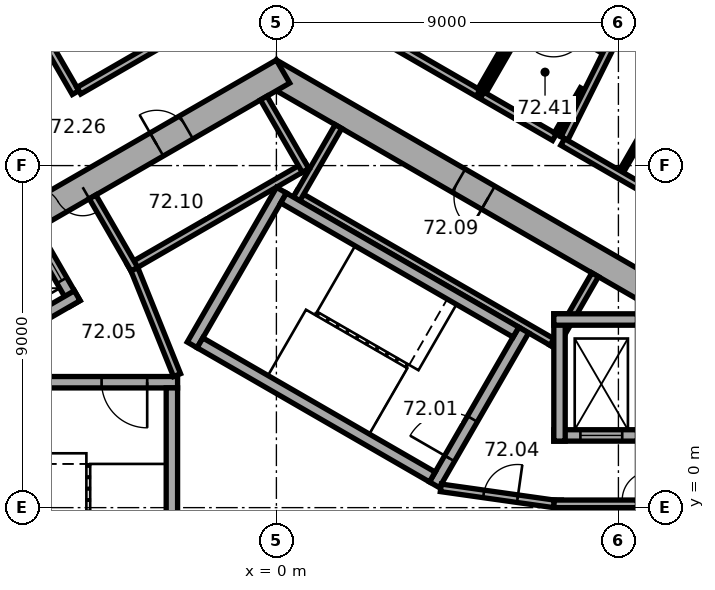
"""IFC4 building model, lengths in metres.
Left out: names, types, materials, properties, quantities, classifications, styles, units other than length and angle.
Written with IfcOpenShell. Run it as: python <this file> out.ifc"""

import sys

from ifc_helpers import new_model, si_unit, direction, frame, frame_2d, origin, place, context, subcontext, project, spatial, rectangle, extrude, element, fill, save


model = new_model("IFC4")
c1 = context("Model", 3, precision=1e-05, world=origin(), true_north=direction((0.0, 1.0)))
c2 = subcontext(c1, "Body", "Model", "MODEL_VIEW")
j1 = project(units=[si_unit("LENGTHUNIT", "METRE"), si_unit("PLANEANGLEUNIT", "RADIAN")], contexts=[c1])
p1 = place(None, origin())
s1 = spatial("IfcSite", under=j1, at=p1, CompositionType="ELEMENT")
p2 = place(p1, origin())
s2 = spatial("IfcBuilding", under=s1, at=p2, CompositionType="ELEMENT")
p3 = place(p2, frame((0.0, 0.0, 293.1)))
s3 = spatial("IfcBuildingStorey", under=s2, at=p3, CompositionType="ELEMENT", Elevation=293.1)
p4 = place(p3, frame((10.025, 5.586, 0.0), z_axis=(0.0, 0.0, 1.0), x_axis=(-0.866026453023, 0.499998182661, 0.0)))
e1 = element("IfcWall", 1, at=p4, inside=s3, PredefinedType="SHEAR", context=c2, shape_type="SweptSolid", body=[
    extrude(rectangle(XDim=11.778, YDim=0.7, at=frame_2d((5.889, 0.0))), origin(), (0.0, 0.0, 1.0), 3.7),
])
p5 = place(p4, frame((5.139, 0.0, 0.0)))
e2 = element("IfcOpeningElement", 2, at=p5, cuts=e1, PredefinedType="OPENING", context=c2, shape_type="SweptSolid", body=[
    extrude(rectangle(XDim=0.9, YDim=2.1, at=frame_2d((0.45, 1.05))), frame((0.0, 0.36, 0.0), z_axis=(0.0, -1.0, 0.0), x_axis=(1.0, 0.0, 0.0)), (0.0, 0.0, 1.0), 0.72),
])
p6 = place(p3, frame((0.175, 11.475, 0.0), z_axis=(0.0, 0.0, 1.0), x_axis=(-0.866026453023, -0.499998182661, 0.0)))
e3 = element("IfcWall", 3, at=p6, inside=s3, PredefinedType="SHEAR", context=c2, shape_type="SweptSolid", body=[
    extrude(rectangle(XDim=11.778, YDim=0.7, at=frame_2d((5.889, 0.0))), origin(), (0.0, 0.0, 1.0), 3.7),
])
p7 = place(p6, frame((6.089, 0.0, 0.0)))
e4 = element("IfcOpeningElement", 4, at=p7, cuts=e3, PredefinedType="OPENING", context=c2, shape_type="SweptSolid", body=[
    extrude(rectangle(XDim=1.5, YDim=2.1, at=frame_2d((0.75, 1.05))), frame((0.0, 0.36, 0.0), z_axis=(0.0, -1.0, 0.0), x_axis=(1.0, 0.0, 0.0)), (0.0, 0.0, 1.0), 0.72),
])
p8 = place(p6, frame((2.939, 0.0, 0.0)))
e5 = element("IfcOpeningElement", 5, at=p8, cuts=e3, PredefinedType="OPENING", context=c2, shape_type="SweptSolid", body=[
    extrude(rectangle(XDim=0.9, YDim=2.1, at=frame_2d((0.45, 1.05))), frame((0.0, 0.36, 0.0), z_axis=(0.0, -1.0, 0.0), x_axis=(1.0, 0.0, 0.0)), (0.0, 0.0, 1.0), 0.72),
])
p9 = place(p3, frame((-2.624, 20.713, 0.0), z_axis=(0.0, 0.0, 1.0), x_axis=(-0.866026460444, -0.499998169808, 0.0)))
e6 = element("IfcWall", 6, at=p9, inside=s3, PredefinedType="STANDARD", context=c2, shape_type="SweptSolid", body=[
    extrude(rectangle(XDim=17.731, YDim=0.2, at=frame_2d((8.866, 0.0))), origin(), (0.0, 0.0, 1.0), 3.7),
])
p10 = place(p9, frame((1.203, 0.0, 0.9)))
e7 = element("IfcOpeningElement", 7, at=p10, cuts=e6, PredefinedType="OPENING", context=c2, shape_type="SweptSolid", body=[
    extrude(rectangle(XDim=2.0, YDim=2.0, at=frame_2d((1.0, 1.0))), frame((0.0, 0.11, 0.0), z_axis=(0.0, -1.0, 0.0), x_axis=(1.0, 0.0, 0.0)), (0.0, 0.0, 1.0), 0.22),
])
p11 = place(p9, frame((4.535, 0.0, 0.9)))
e8 = element("IfcOpeningElement", 8, at=p11, cuts=e6, PredefinedType="OPENING", context=c2, shape_type="SweptSolid", body=[
    extrude(rectangle(XDim=2.0, YDim=2.0, at=frame_2d((1.0, 1.0))), frame((0.0, 0.11, 0.0), z_axis=(0.0, -1.0, 0.0), x_axis=(1.0, 0.0, 0.0)), (0.0, 0.0, 1.0), 0.22),
])
p12 = place(p9, frame((7.867, 0.0, 0.9)))
e9 = element("IfcOpeningElement", 9, at=p12, cuts=e6, PredefinedType="OPENING", context=c2, shape_type="SweptSolid", body=[
    extrude(rectangle(XDim=2.0, YDim=2.0, at=frame_2d((1.0, 1.0))), frame((0.0, 0.11, 0.0), z_axis=(0.0, -1.0, 0.0), x_axis=(1.0, 0.0, 0.0)), (0.0, 0.0, 1.0), 0.22),
])
p13 = place(p9, frame((11.198, 0.0, 0.9)))
e10 = element("IfcOpeningElement", 10, at=p13, cuts=e6, PredefinedType="OPENING", context=c2, shape_type="SweptSolid", body=[
    extrude(rectangle(XDim=2.0, YDim=2.0, at=frame_2d((1.0, 1.0))), frame((0.0, 0.11, 0.0), z_axis=(0.0, -1.0, 0.0), x_axis=(1.0, 0.0, 0.0)), (0.0, 0.0, 1.0), 0.22),
])
p14 = place(p9, frame((14.53, 0.0, 0.9)))
e11 = element("IfcOpeningElement", 11, at=p14, cuts=e6, PredefinedType="OPENING", context=c2, shape_type="SweptSolid", body=[
    extrude(rectangle(XDim=2.0, YDim=2.0, at=frame_2d((1.0, 1.0))), frame((0.0, 0.11, 0.0), z_axis=(0.0, -1.0, 0.0), x_axis=(1.0, 0.0, 0.0)), (0.0, 0.0, 1.0), 0.22),
])
p15 = place(p3, frame((7.4, -5.2, 0.0), z_axis=(0.0, 0.0, 1.0), x_axis=(0.0, 1.0, 0.0)))
e12 = element("IfcWall", 12, at=p15, inside=s3, PredefinedType="PARTITIONING", context=c2, shape_type="SweptSolid", body=[
    extrude(rectangle(XDim=5.4, YDim=0.2, at=frame_2d((2.7, 0.0))), origin(), (0.0, 0.0, 1.0), 3.42),
])
p16 = place(p3, frame((7.3, 0.1, 0.0), z_axis=(0.0, 0.0, 1.0), x_axis=(1.0, 0.0, 0.0)))
e13 = element("IfcWall", 13, at=p16, inside=s3, PredefinedType="PARTITIONING", context=c2, shape_type="SweptSolid", body=[
    extrude(rectangle(XDim=2.2, YDim=0.2, at=frame_2d((1.1, 0.0))), origin(), (0.0, 0.0, 1.0), 3.42),
])
p17 = place(p3, frame((7.424, 4.259, 0.0), z_axis=(0.0, 0.0, 1.0), x_axis=(-0.866026010844, 0.49999894854, 0.0)))
e14 = element("IfcWall", 14, at=p17, inside=s3, PredefinedType="PARTITIONING", context=c2, shape_type="SweptSolid", body=[
    extrude(rectangle(XDim=8.0, YDim=0.2, at=frame_2d((4.0, 0.0))), origin(), (0.0, 0.0, 1.0), 3.42),
])
for number, where, z_axis, x_axis in (
    (15, (7.287, 4.222, 0.0), (0.0, 0.0, 1.0), (0.5, 0.866, 0.0)),
    (16, (0.532, 8.122, 0.0), (0.0, 0.0, 1.0), (0.5, 0.866, 0.0)),
):
    element("IfcWall", number, at=place(p3, frame(where, z_axis=z_axis, x_axis=x_axis)), inside=s3, PredefinedType="PARTITIONING", context=c2, shape_type="SweptSolid", body=[
        extrude(rectangle(XDim=2.2, YDim=0.2, at=frame_2d((1.1, 0.0))), origin(), (0.0, 0.0, 1.0), 3.42),
    ])
p18 = place(p3, frame((0.803, 9.009, 0.0), z_axis=(0.0, 0.0, 1.0), x_axis=(-0.866028230842, -0.499995103361, 0.0)))
e17 = element("IfcWall", 17, at=p18, inside=s3, PredefinedType="PARTITIONING", context=c2, shape_type="SweptSolid", body=[
    extrude(rectangle(XDim=5.4, YDim=0.2, at=frame_2d((2.7, 0.0))), origin(), (0.0, 0.0, 1.0), 3.42),
])
p19 = place(p3, frame((0.767, 8.872, 0.0), z_axis=(0.0, 0.0, 1.0), x_axis=(-0.499994660107, 0.866028486751, 0.0)))
e18 = element("IfcWall", 18, at=p19, inside=s3, PredefinedType="PARTITIONING", context=c2, shape_type="SweptSolid", body=[
    extrude(rectangle(XDim=2.2, YDim=0.2, at=frame_2d((1.1, 0.0))), origin(), (0.0, 0.0, 1.0), 3.42),
])
p20 = place(p3, frame((-3.737, 6.272, 0.0), z_axis=(0.0, 0.0, 1.0), x_axis=(-0.50002983664, 0.866008176907, 0.0)))
e19 = element("IfcWall", 19, at=p20, inside=s3, PredefinedType="PARTITIONING", context=c2, shape_type="SweptSolid", body=[
    extrude(rectangle(XDim=2.2, YDim=0.2, at=frame_2d((1.1, 0.0))), origin(), (0.0, 0.0, 1.0), 3.42),
])
p21 = place(p3, frame((4.158, 0.602, 0.0), z_axis=(0.0, 0.0, 1.0), x_axis=(0.499977259774, 0.866038532462, 0.0)))
e20 = element("IfcWall", 20, at=p21, inside=s3, PredefinedType="SHEAR", context=c2, shape_type="SweptSolid", body=[
    extrude(rectangle(XDim=4.7, YDim=0.3, at=frame_2d((2.35, 0.0))), origin(), (0.0, 0.0, 1.0), 3.42),
])
p22 = place(p21, frame((0.8, 0.0, 0.0)))
e21 = element("IfcOpeningElement", 21, at=p22, cuts=e20, PredefinedType="OPENING", context=c2, shape_type="SweptSolid", body=[
    extrude(rectangle(XDim=1.2, YDim=2.1, at=frame_2d((0.6, 1.05))), frame((0.0, 0.16, 0.0), z_axis=(0.0, -1.0, 0.0), x_axis=(1.0, 0.0, 0.0)), (0.0, 0.0, 1.0), 0.32),
])
p23 = place(p3, frame((-2.216, 4.282, 0.0), z_axis=(0.0, 0.0, 1.0), x_axis=(0.499977259774, 0.866038532462, 0.0)))
e22 = element("IfcWall", 22, at=p23, inside=s3, PredefinedType="SHEAR", context=c2, shape_type="SweptSolid", body=[
    extrude(rectangle(XDim=4.7, YDim=0.3, at=frame_2d((2.35, 0.0))), origin(), (0.0, 0.0, 1.0), 3.42),
])
for number, where, z_axis, x_axis in (
    (23, (4.103, 0.807, 0.0), (0.0, 0.0, 1.0), (-0.866, 0.5, 0.0)),
    (24, (6.303, 4.617, 0.0), (0.0, 0.0, 1.0), (-0.866, 0.5, 0.0)),
):
    element("IfcWall", number, at=place(p3, frame(where, z_axis=z_axis, x_axis=x_axis)), inside=s3, PredefinedType="SHEAR", context=c2, shape_type="SweptSolid", body=[
        extrude(rectangle(XDim=7.06, YDim=0.3, at=frame_2d((3.53, 0.0))), origin(), (0.0, 0.0, 1.0), 3.42),
    ])
p24 = place(p3, frame((-2.6, 3.3, 0.0), z_axis=(0.0, 0.0, 1.0), x_axis=(-1.0, 0.0, 0.0)))
e25 = element("IfcWall", 25, at=p24, inside=s3, PredefinedType="SHEAR", context=c2, shape_type="SweptSolid", body=[
    extrude(rectangle(XDim=4.7, YDim=0.3, at=frame_2d((2.35, 0.0))), origin(), (0.0, 0.0, 1.0), 3.42),
])
p25 = place(p24, frame((0.8, 0.0, 0.0)))
e26 = element("IfcOpeningElement", 26, at=p25, cuts=e25, PredefinedType="OPENING", context=c2, shape_type="SweptSolid", body=[
    extrude(rectangle(XDim=1.2, YDim=2.1, at=frame_2d((0.6, 1.05))), frame((0.0, 0.16, 0.0), z_axis=(0.0, -1.0, 0.0), x_axis=(1.0, 0.0, 0.0)), (0.0, 0.0, 1.0), 0.32),
])
p26 = place(p3, frame((-2.75, 3.15, 0.0), z_axis=(0.0, 0.0, 1.0), x_axis=(0.0, -1.0, 0.0)))
e27 = element("IfcWall", 27, at=p26, inside=s3, PredefinedType="SHEAR", context=c2, shape_type="SweptSolid", body=[
    extrude(rectangle(XDim=7.06, YDim=0.3, at=frame_2d((3.53, 0.0))), origin(), (0.0, 0.0, 1.0), 3.42),
])
p27 = place(p3, frame((7.3, 1.9, 0.0), z_axis=(0.0, 0.0, 1.0), x_axis=(1.0, 0.0, 0.0)))
e28 = element("IfcWall", 28, at=p27, inside=s3, PredefinedType="SHEAR", context=c2, shape_type="SweptSolid", body=[
    extrude(rectangle(XDim=2.2, YDim=0.3, at=frame_2d((1.1, 0.0))), origin(), (0.0, 0.0, 1.0), 3.42),
])
p28 = place(p27, frame((0.7, 0.0, 0.0)))
e29 = element("IfcOpeningElement", 29, at=p28, cuts=e28, PredefinedType="OPENING", context=c2, shape_type="SweptSolid", body=[
    extrude(rectangle(XDim=1.1, YDim=2.1, at=frame_2d((0.55, 1.05))), frame((0.0, 0.16, 0.0), z_axis=(0.0, -1.0, 0.0), x_axis=(1.0, 0.0, 0.0)), (0.0, 0.0, 1.0), 0.32),
])
p29 = place(p3, frame((7.45, 1.75, 0.0), z_axis=(0.0, 0.0, 1.0), x_axis=(0.0, 1.0, 0.0)))
e30 = element("IfcWall", 30, at=p29, inside=s3, PredefinedType="SHEAR", context=c2, shape_type="SweptSolid", body=[
    extrude(rectangle(XDim=3.35, YDim=0.3, at=frame_2d((1.675, 0.0))), origin(), (0.0, 0.0, 1.0), 3.42),
])
p30 = place(p3, frame((7.3, 4.95, 0.0), z_axis=(0.0, 0.0, 1.0), x_axis=(1.0, 0.0, 0.0)))
e31 = element("IfcWall", 31, at=p30, inside=s3, PredefinedType="SHEAR", context=c2, shape_type="SweptSolid", body=[
    extrude(rectangle(XDim=2.2, YDim=0.3, at=frame_2d((1.1, 0.0))), origin(), (0.0, 0.0, 1.0), 3.42),
])
p31 = place(p3, frame((4.327, 0.521, 0.0), z_axis=(0.0, 0.0, 1.0), x_axis=(0.990124376366, -0.14019172346, 0.0)))
e32 = element("IfcWall", 32, at=p31, inside=s3, PredefinedType="PARTITIONING", context=c2, shape_type="SweptSolid", body=[
    extrude(rectangle(XDim=3.002, YDim=0.2, at=frame_2d((1.501, 0.0))), origin(), (0.0, 0.0, 1.0), 3.42),
])
p32 = place(p31, frame((1.138, 0.0, 0.0)))
e33 = element("IfcOpeningElement", 33, at=p32, cuts=e32, PredefinedType="OPENING", context=c2, shape_type="SweptSolid", body=[
    extrude(rectangle(XDim=0.9, YDim=2.1, at=frame_2d((0.45, 1.05))), frame((0.0, 0.11, 0.0), z_axis=(0.0, -1.0, 0.0), x_axis=(1.0, 0.0, 0.0)), (0.0, 0.0, 1.0), 0.22),
])
p33 = place(p3, frame((-5.295, 5.372, 0.0), z_axis=(0.0, 0.0, 1.0), x_axis=(-0.500077893725, 0.86598042715, 0.0)))
e34 = element("IfcWall", 34, at=p33, inside=s3, PredefinedType="SHEAR", context=c2, shape_type="SweptSolid", body=[
    extrude(rectangle(XDim=2.2, YDim=0.3, at=frame_2d((1.1, 0.0))), origin(), (0.0, 0.0, 1.0), 3.42),
])
p34 = place(p33, frame((0.7, 0.0, 0.0)))
e35 = element("IfcOpeningElement", 35, at=p34, cuts=e34, PredefinedType="OPENING", context=c2, shape_type="SweptSolid", body=[
    extrude(rectangle(XDim=1.1, YDim=2.1, at=frame_2d((0.55, 1.05))), frame((0.0, 0.16, 0.0), z_axis=(0.0, -1.0, 0.0), x_axis=(1.0, 0.0, 0.0)), (0.0, 0.0, 1.0), 0.32),
])
p35 = place(p3, frame((-5.24, 5.577, 0.0), z_axis=(0.0, 0.0, 1.0), x_axis=(-0.866014461049, -0.500018952895, 0.0)))
e36 = element("IfcWall", 36, at=p35, inside=s3, PredefinedType="SHEAR", context=c2, shape_type="SweptSolid", body=[
    extrude(rectangle(XDim=3.35, YDim=0.3, at=frame_2d((1.675, 0.0))), origin(), (0.0, 0.0, 1.0), 3.42),
])
p36 = place(p3, frame((-2.615, 3.487, 0.0), z_axis=(0.0, 0.0, 1.0), x_axis=(-0.373576831041, 0.92759924068, 0.0)))
e37 = element("IfcWall", 37, at=p36, inside=s3, PredefinedType="PARTITIONING", context=c2, shape_type="SweptSolid", body=[
    extrude(rectangle(XDim=3.002, YDim=0.2, at=frame_2d((1.501, 0.0))), origin(), (0.0, 0.0, 1.0), 3.42),
])
p37 = place(p3, frame((-8.46, 16.42, 0.0), z_axis=(0.0, 0.0, 1.0), x_axis=(0.500005339912, -0.866022320763, 0.0)))
e38 = element("IfcWall", 38, at=p37, inside=s3, PredefinedType="PARTITIONING", context=c2, shape_type="SweptSolid", body=[
    extrude(rectangle(XDim=6.35, YDim=0.2, at=frame_2d((3.175, 0.0))), origin(), (0.0, 0.0, 1.0), 2.87),
])
p38 = place(p37, frame((2.675, 0.0, 0.0)))
e39 = element("IfcOpeningElement", 39, at=p38, cuts=e38, PredefinedType="OPENING", context=c2, shape_type="SweptSolid", body=[
    extrude(rectangle(XDim=1.0, YDim=2.1, at=frame_2d((0.5, 1.05))), frame((0.0, 0.11, 0.0), z_axis=(0.0, -1.0, 0.0), x_axis=(1.0, 0.0, 0.0)), (0.0, 0.0, 1.0), 0.22),
])
p39 = place(p3, frame((-0.95, 13.423, 0.0), z_axis=(0.0, 0.0, 1.0), x_axis=(-0.86603557629, -0.499982380289, 0.0)))
e40 = element("IfcWall", 40, at=p39, inside=s3, PredefinedType="PARTITIONING", context=c2, shape_type="SweptSolid", body=[
    extrude(rectangle(XDim=4.906, YDim=0.2, at=frame_2d((2.453, 0.0))), origin(), (0.0, 0.0, 1.0), 3.42),
])
p40 = place(p3, frame((5.308, 10.907, 0.0), z_axis=(0.0, 0.0, 1.0), x_axis=(-0.866028394472, 0.499994819941, 0.0)))
e41 = element("IfcWall", 41, at=p40, inside=s3, PredefinedType="PARTITIONING", context=c2, shape_type="SweptSolid", body=[
    extrude(rectangle(XDim=4.992, YDim=0.2, at=frame_2d((2.496, 0.0))), origin(), (0.0, 0.0, 1.0), 3.42),
])
p41 = place(p3, frame((5.461, 10.934, 0.0), z_axis=(0.0, 0.0, 1.0), x_axis=(0.500004234368, 0.866022959057, 0.0)))
e42 = element("IfcWall", 42, at=p41, inside=s3, PredefinedType="PARTITIONING", context=c2, shape_type="SweptSolid", body=[
    extrude(rectangle(XDim=2.5, YDim=0.12, at=frame_2d((1.25, 0.0))), origin(), (0.0, 0.0, 1.0), 3.42),
])
p42 = place(p3, frame((6.763, 13.069, 0.0), z_axis=(0.0, 0.0, 1.0), x_axis=(0.866019511163, -0.500010206181, 0.0)))
e43 = element("IfcWall", 43, at=p42, inside=s3, PredefinedType="PARTITIONING", context=c2, shape_type="SweptSolid", body=[
    extrude(rectangle(XDim=2.13, YDim=0.12, at=frame_2d((1.065, 0.0))), origin(), (0.0, 0.0, 1.0), 3.42),
])
p43 = place(p42, frame((0.615, 0.0, 0.0)))
e44 = element("IfcOpeningElement", 44, at=p43, cuts=e43, PredefinedType="OPENING", context=c2, shape_type="SweptSolid", body=[
    extrude(rectangle(XDim=0.9, YDim=2.1, at=frame_2d((0.45, 1.05))), frame((0.0, 0.07, 0.0), z_axis=(0.0, -1.0, 0.0), x_axis=(1.0, 0.0, 0.0)), (0.0, 0.0, 1.0), 0.14),
])
p44 = place(p3, frame((7.077, 13.973, 0.0), z_axis=(0.0, 0.0, 1.0), x_axis=(-0.499955923987, -0.866050849587, 0.0)))
e45 = element("IfcWall", 45, at=p44, inside=s3, PredefinedType="PARTITIONING", context=c2, shape_type="SweptSolid", body=[
    extrude(rectangle(XDim=3.44, YDim=0.12, at=frame_2d((1.72, 0.0))), origin(), (0.0, 0.0, 1.0), 3.42),
])
p45 = place(p3, frame((7.317, 9.748, 0.0), z_axis=(0.0, 0.0, 1.0), x_axis=(-0.866028486751, 0.499994660107, 0.0)))
e46 = element("IfcWall", 46, at=p45, inside=s3, PredefinedType="PARTITIONING", context=c2, shape_type="SweptSolid", body=[
    extrude(rectangle(XDim=2.2, YDim=0.2, at=frame_2d((1.1, 0.0))), origin(), (0.0, 0.0, 1.0), 3.42),
])
p46 = place(p3, frame((8.051, 11.019, 0.0), z_axis=(0.0, 0.0, 1.0), x_axis=(-0.500093228334, -0.86597157169, 0.0)))
e47 = element("IfcWall", 47, at=p46, inside=s3, PredefinedType="PARTITIONING", context=c2, shape_type="SweptSolid", body=[
    extrude(rectangle(XDim=1.368, YDim=0.12, at=frame_2d((0.684, 0.0))), origin(), (0.0, 0.0, 1.0), 3.42),
])
p47 = place(p3, frame((9.078, 8.846, 0.0), z_axis=(0.0, 0.0, 1.0), x_axis=(0.500004234368, 0.866022959057, 0.0)))
e48 = element("IfcWall", 48, at=p47, inside=s3, PredefinedType="PARTITIONING", context=c2, shape_type="SweptSolid", body=[
    extrude(rectangle(XDim=2.5, YDim=0.12, at=frame_2d((1.25, 0.0))), origin(), (0.0, 0.0, 1.0), 3.42),
])
p48 = place(p3, frame((10.423, 15.419, 0.0), z_axis=(0.0, 0.0, 1.0), x_axis=(-0.446202606517, -0.894931971681, 0.0)))
e49 = element("IfcWall", 49, at=p48, inside=s3, PredefinedType="PARTITIONING", context=c2, shape_type="SweptSolid", body=[
    extrude(rectangle(XDim=6.377, YDim=0.2, at=frame_2d((3.188, 0.0))), origin(), (0.0, 0.0, 1.0), 2.87),
])
p49 = place(p3, frame((10.934, 7.659, 0.0), z_axis=(0.0, 0.0, 1.0), x_axis=(-0.866034411203, 0.499984398369, 0.0)))
e50 = element("IfcWall", 50, at=p49, inside=s3, PredefinedType="PARTITIONING", context=c2, shape_type="SweptSolid", body=[
    extrude(rectangle(XDim=3.927, YDim=0.2, at=frame_2d((1.963, 0.0))), origin(), (0.0, 0.0, 1.0), 3.42),
])
p50 = place(p7, origin())
e51 = element("IfcDoor", 51, at=p50, inside=s3, OperationType="DOUBLE_DOOR_SINGLE_SWING", PredefinedType="DOOR", context=c2, shape_type="SweptSolid", body=[
    extrude(rectangle(XDim=1.5, YDim=2.1, at=frame_2d((0.75, 1.05))), frame((0.0, 0.025, 0.0), z_axis=(0.0, -1.0, 0.0), x_axis=(1.0, 0.0, 0.0)), (0.0, 0.0, 1.0), 0.05),
])
fill(e4, e51)
p51 = place(p22, origin())
e52 = element("IfcDoor", 52, at=p51, inside=s3, OperationType="SINGLE_SWING_RIGHT", PredefinedType="DOOR", context=c2, shape_type="SweptSolid", body=[
    extrude(rectangle(XDim=1.2, YDim=2.1, at=frame_2d((0.6, 1.05))), frame((0.0, 0.025, 0.0), z_axis=(0.0, -1.0, 0.0), x_axis=(1.0, 0.0, 0.0)), (0.0, 0.0, 1.0), 0.05),
])
fill(e21, e52)
p52 = place(p25, origin())
e53 = element("IfcDoor", 53, at=p52, inside=s3, OperationType="SINGLE_SWING_RIGHT", PredefinedType="DOOR", context=c2, shape_type="SweptSolid", body=[
    extrude(rectangle(XDim=1.2, YDim=2.1, at=frame_2d((0.6, 1.05))), frame((0.0, 0.025, 0.0), z_axis=(0.0, -1.0, 0.0), x_axis=(1.0, 0.0, 0.0)), (0.0, 0.0, 1.0), 0.05),
])
fill(e26, e53)
p53 = place(p32, origin())
e54 = element("IfcDoor", 54, at=p53, inside=s3, OperationType="SINGLE_SWING_LEFT", PredefinedType="DOOR", context=c2, shape_type="SweptSolid", body=[
    extrude(rectangle(XDim=0.9, YDim=2.1, at=frame_2d((0.45, 1.05))), frame((0.0, 0.025, 0.0), z_axis=(0.0, -1.0, 0.0), x_axis=(1.0, 0.0, 0.0)), (0.0, 0.0, 1.0), 0.05),
])
fill(e33, e54)
p54 = place(p5, origin())
e55 = element("IfcDoor", 55, at=p54, inside=s3, OperationType="SINGLE_SWING_LEFT", PredefinedType="DOOR", context=c2, shape_type="SweptSolid", body=[
    extrude(rectangle(XDim=0.9, YDim=2.1, at=frame_2d((0.45, 1.05))), frame((0.0, 0.025, 0.0), z_axis=(0.0, -1.0, 0.0), x_axis=(1.0, 0.0, 0.0)), (0.0, 0.0, 1.0), 0.05),
])
fill(e2, e55)
p55 = place(p8, origin())
e56 = element("IfcDoor", 56, at=p55, inside=s3, OperationType="SINGLE_SWING_LEFT", PredefinedType="DOOR", context=c2, shape_type="SweptSolid", body=[
    extrude(rectangle(XDim=0.9, YDim=2.1, at=frame_2d((0.45, 1.05))), frame((0.0, 0.025, 0.0), z_axis=(0.0, -1.0, 0.0), x_axis=(1.0, 0.0, 0.0)), (0.0, 0.0, 1.0), 0.05),
])
fill(e5, e56)
p56 = place(p28, origin())
e57 = element("IfcDoor", 57, at=p56, inside=s3, OperationType="DOUBLE_DOOR_SLIDING", PredefinedType="DOOR", context=c2, shape_type="SweptSolid", body=[
    extrude(rectangle(XDim=1.1, YDim=2.1, at=frame_2d((0.55, 1.05))), frame((0.0, 0.025, 0.0), z_axis=(0.0, -1.0, 0.0), x_axis=(1.0, 0.0, 0.0)), (0.0, 0.0, 1.0), 0.05),
])
fill(e29, e57)
p57 = place(p34, origin())
e58 = element("IfcDoor", 58, at=p57, inside=s3, OperationType="DOUBLE_DOOR_SLIDING", PredefinedType="DOOR", context=c2, shape_type="SweptSolid", body=[
    extrude(rectangle(XDim=1.1, YDim=2.1, at=frame_2d((0.55, 1.05))), frame((0.0, 0.025, 0.0), z_axis=(0.0, -1.0, 0.0), x_axis=(1.0, 0.0, 0.0)), (0.0, 0.0, 1.0), 0.05),
])
fill(e35, e58)
save(model, sys.argv[1])
